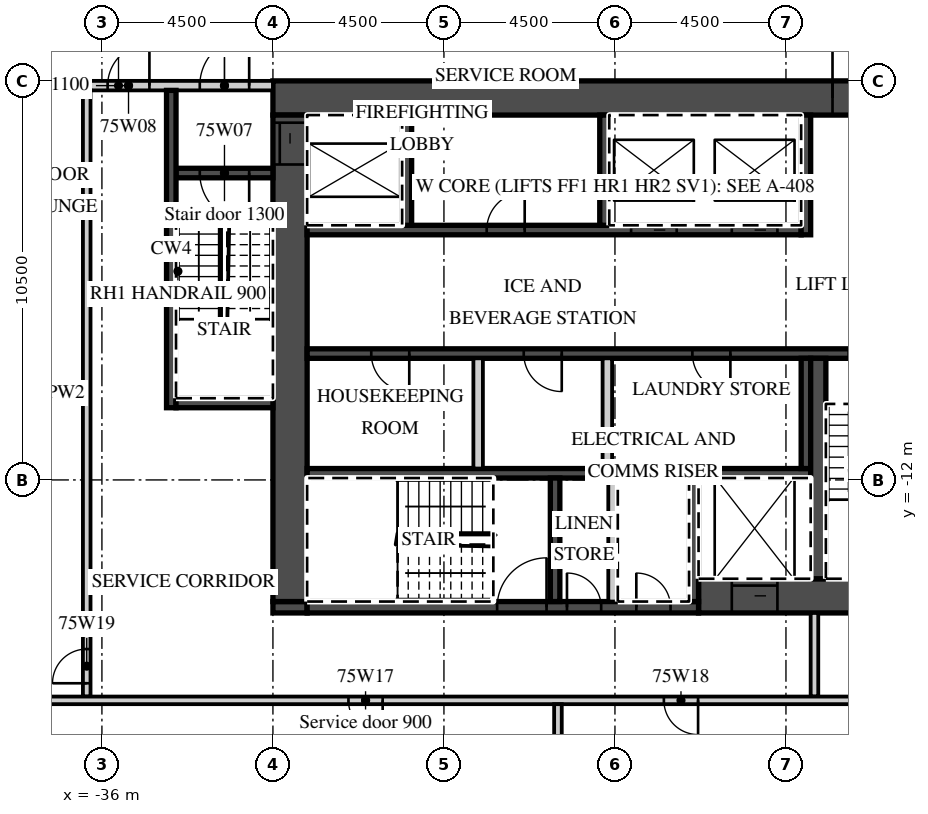
"""IFC4 building model, lengths in metres.
Left out: names, types, materials, properties, quantities, classifications, styles, units other than length and angle.
Written with IfcOpenShell. Run it as: python <this file> out.ifc"""

import sys

from ifc_helpers import new_model, si_unit, direction, frame, frame_2d, origin, place, context, subcontext, project, spatial, rectangle, extrude, element, fill, save


model = new_model("IFC4")
c1 = context("Model", 3, precision=1e-05, world=origin(), true_north=direction((0.0, 1.0)))
c2 = subcontext(c1, "Body", "Model", "MODEL_VIEW")
j1 = project(units=[si_unit("LENGTHUNIT", "METRE"), si_unit("PLANEANGLEUNIT", "RADIAN")], contexts=[c1])
p1 = place(None, origin())
s1 = spatial("IfcSite", under=j1, at=p1, CompositionType="ELEMENT")
p2 = place(p1, origin())
s2 = spatial("IfcBuilding", under=s1, at=p2, CompositionType="ELEMENT")
p3 = place(p2, frame((0.0, 0.0, 298.2)))
s3 = spatial("IfcBuildingStorey", under=s2, at=p3, CompositionType="ELEMENT", Elevation=298.2)
p4 = place(p3, frame((-31.5, -1.95, 0.0), z_axis=(0.0, 0.0, 1.0), x_axis=(1.0, 0.0, 0.0)))
e1 = element("IfcWall", 1, at=p4, inside=s3, PredefinedType="SHEAR", context=c2, shape_type="SweptSolid", body=[
    extrude(rectangle(XDim=18.0, YDim=0.9, at=frame_2d((9.0, 0.0))), origin(), (0.0, 0.0, 1.0), 3.02),
])
p5 = place(p4, frame((14.725, 0.0, 0.0)))
e2 = element("IfcOpeningElement", 2, at=p5, cuts=e1, PredefinedType="OPENING", context=c2, shape_type="SweptSolid", body=[
    extrude(rectangle(XDim=1.8, YDim=2.1, at=frame_2d((0.9, 1.05))), frame((0.0, 0.46, 0.0), z_axis=(0.0, -1.0, 0.0), x_axis=(1.0, 0.0, 0.0)), (0.0, 0.0, 1.0), 0.92),
])
p6 = place(p3, frame((-20.3, -15.05, 0.0), z_axis=(0.0, 0.0, 1.0), x_axis=(1.0, 0.0, 0.0)))
e3 = element("IfcWall", 3, at=p6, inside=s3, PredefinedType="SHEAR", context=c2, shape_type="SweptSolid", body=[
    extrude(rectangle(XDim=6.8, YDim=0.9, at=frame_2d((3.4, 0.0))), origin(), (0.0, 0.0, 1.0), 3.02),
])
p7 = place(p6, frame((0.875, 0.0, 0.0)))
e4 = element("IfcOpeningElement", 4, at=p7, cuts=e3, PredefinedType="OPENING", context=c2, shape_type="SweptSolid", body=[
    extrude(rectangle(XDim=1.2, YDim=2.1, at=frame_2d((0.6, 1.05))), frame((0.0, 0.46, 0.0), z_axis=(0.0, -1.0, 0.0), x_axis=(1.0, 0.0, 0.0)), (0.0, 0.0, 1.0), 0.92),
])
p8 = place(p3, frame((-31.5, -15.35, 0.0), z_axis=(0.0, 0.0, 1.0), x_axis=(1.0, 0.0, 0.0)))
e5 = element("IfcWall", 5, at=p8, inside=s3, PredefinedType="SHEAR", context=c2, shape_type="SweptSolid", body=[
    extrude(rectangle(XDim=0.9, YDim=0.3, at=frame_2d((0.45, 0.0))), origin(), (0.0, 0.0, 1.0), 3.02),
])
p9 = place(p3, frame((-30.6, -15.35, 0.0), z_axis=(0.0, 0.0, 1.0), x_axis=(1.0, 0.0, 0.0)))
e6 = element("IfcWall", 6, at=p9, inside=s3, PredefinedType="SHEAR", context=c2, shape_type="SweptSolid", body=[
    extrude(rectangle(XDim=10.3, YDim=0.3, at=frame_2d((5.15, 0.0))), origin(), (0.0, 0.0, 1.0), 3.02),
])
p10 = place(p9, frame((5.0, 0.0, 0.0)))
e7 = element("IfcOpeningElement", 7, at=p10, cuts=e6, PredefinedType="OPENING", context=c2, shape_type="SweptSolid", body=[
    extrude(rectangle(XDim=1.3, YDim=2.1, at=frame_2d((0.65, 1.05))), frame((0.0, 0.16, 0.0), z_axis=(0.0, -1.0, 0.0), x_axis=(1.0, 0.0, 0.0)), (0.0, 0.0, 1.0), 0.32),
])
p11 = place(p9, frame((6.837, 0.0, 0.0)))
e8 = element("IfcOpeningElement", 8, at=p11, cuts=e6, PredefinedType="OPENING", context=c2, shape_type="SweptSolid", body=[
    extrude(rectangle(XDim=0.9, YDim=2.1, at=frame_2d((0.45, 1.05))), frame((0.0, 0.16, 0.0), z_axis=(0.0, -1.0, 0.0), x_axis=(1.0, 0.0, 0.0)), (0.0, 0.0, 1.0), 0.32),
])
p12 = place(p9, frame((8.663, 0.0, 0.0)))
e9 = element("IfcOpeningElement", 9, at=p12, cuts=e6, PredefinedType="OPENING", context=c2, shape_type="SweptSolid", body=[
    extrude(rectangle(XDim=0.9, YDim=2.1, at=frame_2d((0.45, 1.05))), frame((0.0, 0.16, 0.0), z_axis=(0.0, -1.0, 0.0), x_axis=(1.0, 0.0, 0.0)), (0.0, 0.0, 1.0), 0.32),
])
p13 = place(p3, frame((-31.05, -15.2, 0.0), z_axis=(0.0, 0.0, 1.0), x_axis=(0.0, 1.0, 0.0)))
e10 = element("IfcWall", 10, at=p13, inside=s3, PredefinedType="SHEAR", context=c2, shape_type="SweptSolid", body=[
    extrude(rectangle(XDim=12.8, YDim=0.9, at=frame_2d((6.4, 0.0))), origin(), (0.0, 0.0, 1.0), 3.02),
])
p14 = place(p13, frame((11.5, 0.0, 0.0)))
e11 = element("IfcOpeningElement", 11, at=p14, cuts=e10, PredefinedType="OPENING", context=c2, shape_type="SweptSolid", body=[
    extrude(rectangle(XDim=1.1, YDim=2.1, at=frame_2d((0.55, 1.05))), frame((0.0, 0.46, 0.0), z_axis=(0.0, -1.0, 0.0), x_axis=(1.0, 0.0, 0.0)), (0.0, 0.0, 1.0), 0.92),
])
p15 = place(p3, frame((-30.6, -5.425, 0.0), z_axis=(0.0, 0.0, 1.0), x_axis=(1.0, 0.0, 0.0)))
e12 = element("IfcWall", 12, at=p15, inside=s3, PredefinedType="SHEAR", context=c2, shape_type="SweptSolid", body=[
    extrude(rectangle(XDim=13.0, YDim=0.25, at=frame_2d((6.5, 0.0))), origin(), (0.0, 0.0, 1.0), 3.02),
])
p16 = place(p15, frame((8.525, 0.0, 0.0)))
e13 = element("IfcOpeningElement", 13, at=p16, cuts=e12, PredefinedType="OPENING", context=c2, shape_type="SweptSolid", body=[
    extrude(rectangle(XDim=1.2, YDim=2.1, at=frame_2d((0.6, 1.05))), frame((0.0, 0.135, 0.0), z_axis=(0.0, -1.0, 0.0), x_axis=(1.0, 0.0, 0.0)), (0.0, 0.0, 1.0), 0.27),
])
p17 = place(p15, frame((11.175, 0.0, 0.0)))
e14 = element("IfcOpeningElement", 14, at=p17, cuts=e12, PredefinedType="OPENING", context=c2, shape_type="SweptSolid", body=[
    extrude(rectangle(XDim=1.2, YDim=2.1, at=frame_2d((0.6, 1.05))), frame((0.0, 0.135, 0.0), z_axis=(0.0, -1.0, 0.0), x_axis=(1.0, 0.0, 0.0)), (0.0, 0.0, 1.0), 0.27),
])
p18 = place(p15, frame((4.725, 0.0, 0.0)))
e15 = element("IfcOpeningElement", 15, at=p18, cuts=e12, PredefinedType="OPENING", context=c2, shape_type="SweptSolid", body=[
    extrude(rectangle(XDim=1.0, YDim=2.1, at=frame_2d((0.5, 1.05))), frame((0.0, 0.135, 0.0), z_axis=(0.0, -1.0, 0.0), x_axis=(1.0, 0.0, 0.0)), (0.0, 0.0, 1.0), 0.27),
])
p19 = place(p3, frame((-17.475, -5.55, 0.0), z_axis=(0.0, 0.0, 1.0), x_axis=(0.0, 1.0, 0.0)))
e16 = element("IfcWall", 16, at=p19, inside=s3, PredefinedType="SHEAR", context=c2, shape_type="SweptSolid", body=[
    extrude(rectangle(XDim=3.15, YDim=0.25, at=frame_2d((1.575, 0.0))), origin(), (0.0, 0.0, 1.0), 3.02),
])
for number, where, z_axis, x_axis in (
    (17, (-27.975, -5.3, 0.0), (0.0, 0.0, 1.0), (0.0, 1.0, 0.0)),
    (18, (-22.775, -5.3, 0.0), (0.0, 0.0, 1.0), (0.0, 1.0, 0.0)),
):
    element("IfcWall", number, at=place(p3, frame(where, z_axis=z_axis, x_axis=x_axis)), inside=s3, PredefinedType="SHEAR", context=c2, shape_type="SweptSolid", body=[
        extrude(rectangle(XDim=2.9, YDim=0.25, at=frame_2d((1.45, 0.0))), origin(), (0.0, 0.0, 1.0), 3.02),
    ])
p20 = place(p3, frame((-30.6, -8.675, 0.0), z_axis=(0.0, 0.0, 1.0), x_axis=(1.0, 0.0, 0.0)))
e19 = element("IfcWall", 19, at=p20, inside=s3, PredefinedType="SHEAR", context=c2, shape_type="SweptSolid", body=[
    extrude(rectangle(XDim=16.2, YDim=0.25, at=frame_2d((8.1, 0.0))), origin(), (0.0, 0.0, 1.0), 3.02),
])
p21 = place(p20, frame((14.25, 0.0, 0.0)))
e20 = element("IfcOpeningElement", 20, at=p21, cuts=e19, PredefinedType="OPENING", context=c2, shape_type="SweptSolid", body=[
    extrude(rectangle(XDim=1.3, YDim=2.1, at=frame_2d((0.65, 1.05))), frame((0.0, 0.135, 0.0), z_axis=(0.0, -1.0, 0.0), x_axis=(1.0, 0.0, 0.0)), (0.0, 0.0, 1.0), 0.27),
])
p22 = place(p20, frame((1.688, 0.0, 0.0)))
e21 = element("IfcOpeningElement", 21, at=p22, cuts=e19, PredefinedType="OPENING", context=c2, shape_type="SweptSolid", body=[
    extrude(rectangle(XDim=1.0, YDim=2.1, at=frame_2d((0.5, 1.05))), frame((0.0, 0.135, 0.0), z_axis=(0.0, -1.0, 0.0), x_axis=(1.0, 0.0, 0.0)), (0.0, 0.0, 1.0), 0.27),
])
p23 = place(p20, frame((5.7, 0.0, 0.0)))
e22 = element("IfcOpeningElement", 22, at=p23, cuts=e19, PredefinedType="OPENING", context=c2, shape_type="SweptSolid", body=[
    extrude(rectangle(XDim=1.0, YDim=2.1, at=frame_2d((0.5, 1.05))), frame((0.0, 0.135, 0.0), z_axis=(0.0, -1.0, 0.0), x_axis=(1.0, 0.0, 0.0)), (0.0, 0.0, 1.0), 0.27),
])
p24 = place(p20, frame((10.137, 0.0, 0.0)))
e23 = element("IfcOpeningElement", 23, at=p24, cuts=e19, PredefinedType="OPENING", context=c2, shape_type="SweptSolid", body=[
    extrude(rectangle(XDim=1.0, YDim=2.1, at=frame_2d((0.5, 1.05))), frame((0.0, 0.135, 0.0), z_axis=(0.0, -1.0, 0.0), x_axis=(1.0, 0.0, 0.0)), (0.0, 0.0, 1.0), 0.27),
])
p25 = place(p3, frame((-30.6, -11.825, 0.0), z_axis=(0.0, 0.0, 1.0), x_axis=(1.0, 0.0, 0.0)))
e24 = element("IfcWall", 24, at=p25, inside=s3, PredefinedType="SHEAR", context=c2, shape_type="SweptSolid", body=[
    extrude(rectangle(XDim=13.25, YDim=0.25, at=frame_2d((6.625, 0.0))), origin(), (0.0, 0.0, 1.0), 3.02),
])
p26 = place(p3, frame((-17.475, -11.7, 0.0), z_axis=(0.0, 0.0, 1.0), x_axis=(0.0, 1.0, 0.0)))
e25 = element("IfcWall", 25, at=p26, inside=s3, PredefinedType="SHEAR", context=c2, shape_type="SweptSolid", body=[
    extrude(rectangle(XDim=2.9, YDim=0.25, at=frame_2d((1.45, 0.0))), origin(), (0.0, 0.0, 1.0), 3.02),
])
for number, where, z_axis, x_axis in (
    (26, (-26.1, -11.7, 0.0), (0.0, 0.0, 1.0), (0.0, 1.0, 0.0)),
    (27, (-22.7, -11.7, 0.0), (0.0, 0.0, 1.0), (0.0, 1.0, 0.0)),
):
    element("IfcWall", number, at=place(p3, frame(where, z_axis=z_axis, x_axis=x_axis)), inside=s3, PredefinedType="PARTITIONING", context=c2, shape_type="SweptSolid", body=[
        extrude(rectangle(XDim=2.9, YDim=0.25, at=frame_2d((1.45, 0.0))), origin(), (0.0, 0.0, 1.0), 3.02),
    ])
p27 = place(p3, frame((-17.15, -14.6, 0.0), z_axis=(0.0, 0.0, 1.0), x_axis=(0.0, 1.0, 0.0)))
e28 = element("IfcWall", 28, at=p27, inside=s3, PredefinedType="SHEAR", context=c2, shape_type="SweptSolid", body=[
    extrude(rectangle(XDim=5.8, YDim=0.4, at=frame_2d((2.9, 0.0))), origin(), (0.0, 0.0, 1.0), 3.02),
])
for number, where, z_axis, x_axis in (
    (29, (-20.425, -15.2, 0.0), (0.0, 0.0, 1.0), (0.0, 1.0, 0.0)),
    (30, (-24.075, -15.2, 0.0), (0.0, 0.0, 1.0), (0.0, 1.0, 0.0)),
):
    element("IfcWall", number, at=place(p3, frame(where, z_axis=z_axis, x_axis=x_axis)), inside=s3, PredefinedType="SHEAR", context=c2, shape_type="SweptSolid", body=[
        extrude(rectangle(XDim=3.25, YDim=0.25, at=frame_2d((1.625, 0.0))), origin(), (0.0, 0.0, 1.0), 3.02),
    ])
p28 = place(p3, frame((-22.55, -15.2, 0.0), z_axis=(0.0, 0.0, 1.0), x_axis=(0.0, 1.0, 0.0)))
e31 = element("IfcWall", 31, at=p28, inside=s3, PredefinedType="PARTITIONING", context=c2, shape_type="SweptSolid", body=[
    extrude(rectangle(XDim=3.25, YDim=0.25, at=frame_2d((1.625, 0.0))), origin(), (0.0, 0.0, 1.0), 3.02),
])
p29 = place(p3, frame((-39.627, -1.625, 0.0), z_axis=(0.0, 0.0, 1.0), x_axis=(1.0, 0.0, 0.0)))
e32 = element("IfcWall", 32, at=p29, inside=s3, PredefinedType="PARTITIONING", context=c2, shape_type="SweptSolid", body=[
    extrude(rectangle(XDim=8.127, YDim=0.25, at=frame_2d((4.063, 0.0))), origin(), (0.0, 0.0, 1.0), 3.02),
])
p30 = place(p29, frame((6.202, 0.0, 0.0)))
e33 = element("IfcOpeningElement", 33, at=p30, cuts=e32, PredefinedType="OPENING", context=c2, shape_type="SweptSolid", body=[
    extrude(rectangle(XDim=1.3, YDim=2.1, at=frame_2d((0.65, 1.05))), frame((0.0, 0.135, 0.0), z_axis=(0.0, -1.0, 0.0), x_axis=(1.0, 0.0, 0.0)), (0.0, 0.0, 1.0), 0.27),
])
p31 = place(p29, frame((3.777, 0.0, 0.0)))
e34 = element("IfcOpeningElement", 34, at=p31, cuts=e32, PredefinedType="OPENING", context=c2, shape_type="SweptSolid", body=[
    extrude(rectangle(XDim=1.1, YDim=2.1, at=frame_2d((0.55, 1.05))), frame((0.0, 0.135, 0.0), z_axis=(0.0, -1.0, 0.0), x_axis=(1.0, 0.0, 0.0)), (0.0, 0.0, 1.0), 0.27),
])
p32 = place(p3, frame((-34.05, -3.925, 0.0), z_axis=(0.0, 0.0, 1.0), x_axis=(1.0, 0.0, 0.0)))
e35 = element("IfcWall", 35, at=p32, inside=s3, PredefinedType="SHEAR", context=c2, shape_type="SweptSolid", body=[
    extrude(rectangle(XDim=2.55, YDim=0.25, at=frame_2d((1.275, 0.0))), origin(), (0.0, 0.0, 1.0), 3.02),
])
p33 = place(p32, frame((0.625, 0.0, 0.0)))
e36 = element("IfcOpeningElement", 36, at=p33, cuts=e35, PredefinedType="OPENING", context=c2, shape_type="SweptSolid", body=[
    extrude(rectangle(XDim=1.3, YDim=2.1, at=frame_2d((0.65, 1.05))), frame((0.0, 0.135, 0.0), z_axis=(0.0, -1.0, 0.0), x_axis=(1.0, 0.0, 0.0)), (0.0, 0.0, 1.0), 0.27),
])
p34 = place(p3, frame((-34.175, -10.1, 0.0), z_axis=(0.0, 0.0, 1.0), x_axis=(0.0, 1.0, 0.0)))
e37 = element("IfcWall", 37, at=p34, inside=s3, PredefinedType="SHEAR", context=c2, shape_type="SweptSolid", body=[
    extrude(rectangle(XDim=8.35, YDim=0.25, at=frame_2d((4.175, 0.0))), origin(), (0.0, 0.0, 1.0), 3.02),
])
p35 = place(p3, frame((-34.05, -9.975, 0.0), z_axis=(0.0, 0.0, 1.0), x_axis=(1.0, 0.0, 0.0)))
e38 = element("IfcWall", 38, at=p35, inside=s3, PredefinedType="SHEAR", context=c2, shape_type="SweptSolid", body=[
    extrude(rectangle(XDim=2.55, YDim=0.25, at=frame_2d((1.275, 0.0))), origin(), (0.0, 0.0, 1.0), 3.02),
])
p36 = place(p3, frame((-17.25, -17.7, 0.0), z_axis=(0.0, 0.0, 1.0), x_axis=(0.0, 1.0, 0.0)))
e39 = element("IfcWall", 39, at=p36, inside=s3, PredefinedType="PARTITIONING", context=c2, shape_type="SweptSolid", body=[
    extrude(rectangle(XDim=2.2, YDim=0.2, at=frame_2d((1.1, 0.0))), origin(), (0.0, 0.0, 1.0), 3.02),
])
p37 = place(p3, frame((-36.4, -17.7, 0.0), z_axis=(0.0, 0.0, 1.0), x_axis=(0.0, 1.0, 0.0)))
e40 = element("IfcWall", 40, at=p37, inside=s3, PredefinedType="PARTITIONING", context=c2, shape_type="SweptSolid", body=[
    extrude(rectangle(XDim=15.95, YDim=0.2, at=frame_2d((7.975, 0.0))), origin(), (0.0, 0.0, 1.0), 3.02),
])
p38 = place(p37, frame((0.35, 0.0, 0.0)))
e41 = element("IfcOpeningElement", 41, at=p38, cuts=e40, PredefinedType="OPENING", context=c2, shape_type="SweptSolid", body=[
    extrude(rectangle(XDim=0.9, YDim=2.1, at=frame_2d((0.45, 1.05))), frame((0.0, 0.11, 0.0), z_axis=(0.0, -1.0, 0.0), x_axis=(1.0, 0.0, 0.0)), (0.0, 0.0, 1.0), 0.22),
])
p39 = place(p3, frame((-38.07, -17.8, 0.0), z_axis=(0.0, 0.0, 1.0), x_axis=(1.0, 0.0, 0.0)))
e42 = element("IfcWall", 42, at=p39, inside=s3, PredefinedType="PARTITIONING", context=c2, shape_type="SweptSolid", body=[
    extrude(rectangle(XDim=24.47, YDim=0.2, at=frame_2d((12.235, 0.0))), origin(), (0.0, 0.0, 1.0), 3.02),
])
p40 = place(p39, frame((8.557, 0.0, 0.0)))
e43 = element("IfcOpeningElement", 43, at=p40, cuts=e42, PredefinedType="OPENING", context=c2, shape_type="SweptSolid", body=[
    extrude(rectangle(XDim=0.9, YDim=2.1, at=frame_2d((0.45, 1.05))), frame((0.0, 0.11, 0.0), z_axis=(0.0, -1.0, 0.0), x_axis=(1.0, 0.0, 0.0)), (0.0, 0.0, 1.0), 0.22),
])
p41 = place(p39, frame((16.857, 0.0, 0.0)))
e44 = element("IfcOpeningElement", 44, at=p41, cuts=e42, PredefinedType="OPENING", context=c2, shape_type="SweptSolid", body=[
    extrude(rectangle(XDim=0.9, YDim=2.1, at=frame_2d((0.45, 1.05))), frame((0.0, 0.11, 0.0), z_axis=(0.0, -1.0, 0.0), x_axis=(1.0, 0.0, 0.0)), (0.0, 0.0, 1.0), 0.22),
])
p42 = place(p3, frame((-24.0, -22.408, 0.0), z_axis=(0.0, 0.0, 1.0), x_axis=(0.0, 1.0, 0.0)))
e45 = element("IfcWall", 45, at=p42, inside=s3, PredefinedType="PARTITIONING", context=c2, shape_type="SweptSolid", body=[
    extrude(rectangle(XDim=4.508, YDim=0.2, at=frame_2d((2.254, 0.0))), origin(), (0.0, 0.0, 1.0), 3.02),
])
p43 = place(p16, origin())
e46 = element("IfcDoor", 46, at=p43, inside=s3, OperationType="SLIDING_TO_LEFT", PredefinedType="DOOR", context=c2, shape_type="SweptSolid", body=[
    extrude(rectangle(XDim=1.2, YDim=2.1, at=frame_2d((0.6, 1.05))), frame((0.0, 0.025, 0.0), z_axis=(0.0, -1.0, 0.0), x_axis=(1.0, 0.0, 0.0)), (0.0, 0.0, 1.0), 0.05),
])
fill(e13, e46)
p44 = place(p17, origin())
e47 = element("IfcDoor", 47, at=p44, inside=s3, OperationType="SLIDING_TO_RIGHT", PredefinedType="DOOR", context=c2, shape_type="SweptSolid", body=[
    extrude(rectangle(XDim=1.2, YDim=2.1, at=frame_2d((0.6, 1.05))), frame((0.0, 0.025, 0.0), z_axis=(0.0, -1.0, 0.0), x_axis=(1.0, 0.0, 0.0)), (0.0, 0.0, 1.0), 0.05),
])
fill(e14, e47)
p45 = place(p7, origin())
e48 = element("IfcDoor", 48, at=p45, inside=s3, OperationType="SLIDING_TO_LEFT", PredefinedType="DOOR", context=c2, shape_type="SweptSolid", body=[
    extrude(rectangle(XDim=1.2, YDim=2.1, at=frame_2d((0.6, 1.05))), frame((0.0, 0.025, 0.0), z_axis=(0.0, -1.0, 0.0), x_axis=(1.0, 0.0, 0.0)), (0.0, 0.0, 1.0), 0.05),
])
fill(e4, e48)
p46 = place(p14, origin())
e49 = element("IfcDoor", 49, at=p46, inside=s3, OperationType="SLIDING_TO_RIGHT", PredefinedType="DOOR", context=c2, shape_type="SweptSolid", body=[
    extrude(rectangle(XDim=1.1, YDim=2.1, at=frame_2d((0.55, 1.05))), frame((0.0, 0.025, 0.0), z_axis=(0.0, -1.0, 0.0), x_axis=(1.0, 0.0, 0.0)), (0.0, 0.0, 1.0), 0.05),
])
fill(e11, e49)
p47 = place(p5, origin())
e50 = element("IfcDoor", 50, at=p47, inside=s3, OperationType="DOUBLE_DOOR_DOUBLE_SWING", PredefinedType="DOOR", context=c2, shape_type="SweptSolid", body=[
    extrude(rectangle(XDim=1.8, YDim=2.1, at=frame_2d((0.9, 1.05))), frame((0.0, 0.025, 0.0), z_axis=(0.0, -1.0, 0.0), x_axis=(1.0, 0.0, 0.0)), (0.0, 0.0, 1.0), 0.05),
])
fill(e2, e50)
p48 = place(p30, origin())
e51 = element("IfcDoor", 51, at=p48, inside=s3, OperationType="SINGLE_SWING_RIGHT", PredefinedType="DOOR", context=c2, shape_type="SweptSolid", body=[
    extrude(rectangle(XDim=1.3, YDim=2.1, at=frame_2d((0.65, 1.05))), frame((0.0, 0.025, 0.0), z_axis=(0.0, -1.0, 0.0), x_axis=(1.0, 0.0, 0.0)), (0.0, 0.0, 1.0), 0.05),
])
fill(e33, e51)
p49 = place(p33, origin())
e52 = element("IfcDoor", 52, at=p49, inside=s3, OperationType="SINGLE_SWING_RIGHT", PredefinedType="DOOR", context=c2, shape_type="SweptSolid", body=[
    extrude(rectangle(XDim=1.3, YDim=2.1, at=frame_2d((0.65, 1.05))), frame((0.0, 0.025, 0.0), z_axis=(0.0, -1.0, 0.0), x_axis=(1.0, 0.0, 0.0)), (0.0, 0.0, 1.0), 0.05),
])
fill(e36, e52)
p50 = place(p31, origin())
e53 = element("IfcDoor", 53, at=p50, inside=s3, OperationType="SINGLE_SWING_RIGHT", PredefinedType="DOOR", context=c2, shape_type="SweptSolid", body=[
    extrude(rectangle(XDim=1.1, YDim=2.1, at=frame_2d((0.55, 1.05))), frame((0.0, 0.025, 0.0), z_axis=(0.0, -1.0, 0.0), x_axis=(1.0, 0.0, 0.0)), (0.0, 0.0, 1.0), 0.05),
])
fill(e34, e53)
p51 = place(p21, origin())
e54 = element("IfcDoor", 54, at=p51, inside=s3, OperationType="SINGLE_SWING_RIGHT", PredefinedType="DOOR", context=c2, shape_type="SweptSolid", body=[
    extrude(rectangle(XDim=1.3, YDim=2.1, at=frame_2d((0.65, 1.05))), frame((0.0, 0.025, 0.0), z_axis=(0.0, -1.0, 0.0), x_axis=(1.0, 0.0, 0.0)), (0.0, 0.0, 1.0), 0.05),
])
fill(e20, e54)
p52 = place(p10, origin())
e55 = element("IfcDoor", 55, at=p52, inside=s3, OperationType="SINGLE_SWING_RIGHT", PredefinedType="DOOR", context=c2, shape_type="SweptSolid", body=[
    extrude(rectangle(XDim=1.3, YDim=2.1, at=frame_2d((0.65, 1.05))), frame((0.0, 0.025, 0.0), z_axis=(0.0, -1.0, 0.0), x_axis=(1.0, 0.0, 0.0)), (0.0, 0.0, 1.0), 0.05),
])
fill(e7, e55)
p53 = place(p11, origin())
e56 = element("IfcDoor", 56, at=p53, inside=s3, OperationType="SINGLE_SWING_LEFT", PredefinedType="DOOR", context=c2, shape_type="SweptSolid", body=[
    extrude(rectangle(XDim=0.9, YDim=2.1, at=frame_2d((0.45, 1.05))), frame((0.0, 0.025, 0.0), z_axis=(0.0, -1.0, 0.0), x_axis=(1.0, 0.0, 0.0)), (0.0, 0.0, 1.0), 0.05),
])
fill(e8, e56)
p54 = place(p12, origin())
e57 = element("IfcDoor", 57, at=p54, inside=s3, OperationType="SINGLE_SWING_LEFT", PredefinedType="DOOR", context=c2, shape_type="SweptSolid", body=[
    extrude(rectangle(XDim=0.9, YDim=2.1, at=frame_2d((0.45, 1.05))), frame((0.0, 0.025, 0.0), z_axis=(0.0, -1.0, 0.0), x_axis=(1.0, 0.0, 0.0)), (0.0, 0.0, 1.0), 0.05),
])
fill(e9, e57)
p55 = place(p22, origin())
e58 = element("IfcDoor", 58, at=p55, inside=s3, OperationType="SINGLE_SWING_RIGHT", PredefinedType="DOOR", context=c2, shape_type="SweptSolid", body=[
    extrude(rectangle(XDim=1.0, YDim=2.1, at=frame_2d((0.5, 1.05))), frame((0.0, 0.025, 0.0), z_axis=(0.0, -1.0, 0.0), x_axis=(1.0, 0.0, 0.0)), (0.0, 0.0, 1.0), 0.05),
])
fill(e21, e58)
p56 = place(p23, origin())
e59 = element("IfcDoor", 59, at=p56, inside=s3, OperationType="SINGLE_SWING_RIGHT", PredefinedType="DOOR", context=c2, shape_type="SweptSolid", body=[
    extrude(rectangle(XDim=1.0, YDim=2.1, at=frame_2d((0.5, 1.05))), frame((0.0, 0.025, 0.0), z_axis=(0.0, -1.0, 0.0), x_axis=(1.0, 0.0, 0.0)), (0.0, 0.0, 1.0), 0.05),
])
fill(e22, e59)
p57 = place(p24, origin())
e60 = element("IfcDoor", 60, at=p57, inside=s3, OperationType="SINGLE_SWING_RIGHT", PredefinedType="DOOR", context=c2, shape_type="SweptSolid", body=[
    extrude(rectangle(XDim=1.0, YDim=2.1, at=frame_2d((0.5, 1.05))), frame((0.0, 0.025, 0.0), z_axis=(0.0, -1.0, 0.0), x_axis=(1.0, 0.0, 0.0)), (0.0, 0.0, 1.0), 0.05),
])
fill(e23, e60)
p58 = place(p18, origin())
e61 = element("IfcDoor", 61, at=p58, inside=s3, OperationType="SINGLE_SWING_RIGHT", PredefinedType="DOOR", context=c2, shape_type="SweptSolid", body=[
    extrude(rectangle(XDim=1.0, YDim=2.1, at=frame_2d((0.5, 1.05))), frame((0.0, 0.025, 0.0), z_axis=(0.0, -1.0, 0.0), x_axis=(1.0, 0.0, 0.0)), (0.0, 0.0, 1.0), 0.05),
])
fill(e15, e61)
p59 = place(p40, origin())
e62 = element("IfcDoor", 62, at=p59, inside=s3, OperationType="SINGLE_SWING_RIGHT", PredefinedType="DOOR", context=c2, shape_type="SweptSolid", body=[
    extrude(rectangle(XDim=0.9, YDim=2.1, at=frame_2d((0.45, 1.05))), frame((0.0, 0.025, 0.0), z_axis=(0.0, -1.0, 0.0), x_axis=(1.0, 0.0, 0.0)), (0.0, 0.0, 1.0), 0.05),
])
fill(e43, e62)
p60 = place(p41, origin())
e63 = element("IfcDoor", 63, at=p60, inside=s3, OperationType="SINGLE_SWING_RIGHT", PredefinedType="DOOR", context=c2, shape_type="SweptSolid", body=[
    extrude(rectangle(XDim=0.9, YDim=2.1, at=frame_2d((0.45, 1.05))), frame((0.0, 0.025, 0.0), z_axis=(0.0, -1.0, 0.0), x_axis=(1.0, 0.0, 0.0)), (0.0, 0.0, 1.0), 0.05),
])
fill(e44, e63)
p61 = place(p38, origin())
e64 = element("IfcDoor", 64, at=p61, inside=s3, OperationType="SINGLE_SWING_LEFT", PredefinedType="DOOR", context=c2, shape_type="SweptSolid", body=[
    extrude(rectangle(XDim=0.9, YDim=2.1, at=frame_2d((0.45, 1.05))), frame((0.0, 0.025, 0.0), z_axis=(0.0, -1.0, 0.0), x_axis=(1.0, 0.0, 0.0)), (0.0, 0.0, 1.0), 0.05),
])
fill(e41, e64)
save(model, sys.argv[1])
